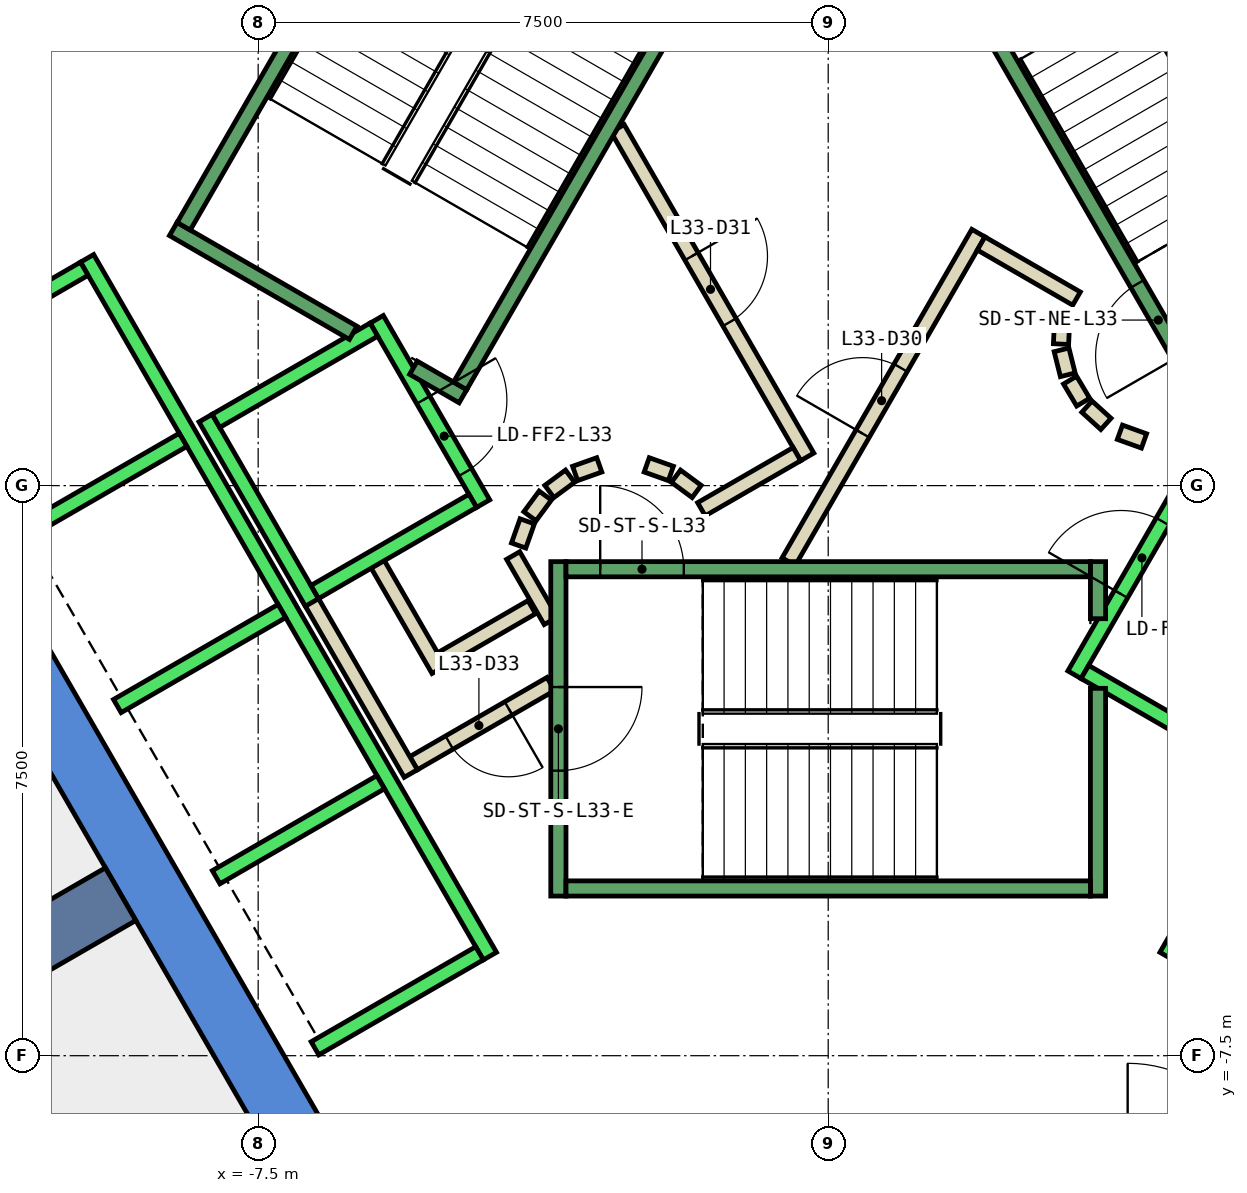
"""IFC4 building model, lengths in metres.
Left out: names, types, materials, properties, quantities, classifications, styles, units other than length and angle.
Written with IfcOpenShell. Run it as: python <this file> out.ifc"""

import sys

from ifc_helpers import new_model, si_unit, direction, frame, frame_2d, origin, place, context, subcontext, project, spatial, polyline, rectangle, outline, extrude, element, fill, save


model = new_model("IFC4")
c1 = context("Model", 3, precision=1e-05, world=origin(), true_north=direction((0.0, 1.0)))
c2 = subcontext(c1, "Body", "Model", "MODEL_VIEW")
j1 = project(units=[si_unit("LENGTHUNIT", "METRE"), si_unit("PLANEANGLEUNIT", "RADIAN")], contexts=[c1])
p1 = place(None, origin())
s1 = spatial("IfcSite", under=j1, at=p1, CompositionType="ELEMENT")
p2 = place(p1, origin())
s2 = spatial("IfcBuilding", under=s1, at=p2, CompositionType="ELEMENT")
p3 = place(p2, frame((0.0, 0.0, 150.8)))
s3 = spatial("IfcBuildingStorey", under=s2, at=p3, CompositionType="ELEMENT", Elevation=150.8)
p4 = place(p3, frame((0.0, 0.0, -0.4)))
e1 = element("IfcWall", 1, at=p4, inside=s3, PredefinedType="SHEAR", context=c2, shape_type="SweptSolid", body=[
    extrude(outline(polyline([(-12.267, 5.252), (-11.575, 4.852), (-6.466, 13.7), (-6.928, 14.5), (-12.267, 5.252)])), origin(), (0.0, 0.0, 1.0), 4.2),
])
p5 = place(p3, frame((0.0, 0.0, -0.4)))
e2 = element("IfcWall", 2, at=p5, inside=s3, PredefinedType="SHEAR", context=c2, shape_type="SweptSolid", body=[
    extrude(outline(polyline([(-13.856, 2.5), (-6.928, -9.5), (-6.466, -8.7), (-12.933, 2.5), (-13.856, 2.5)])), origin(), (0.0, 0.0, 1.0), 4.2),
])
p6 = place(p3, frame((-9.31, -5.375, -0.4), z_axis=(0.0, 0.0, 1.0), x_axis=(-0.866017533419, -0.500013631625, 0.0)))
e3 = element("IfcWall", 3, at=p6, inside=s3, PredefinedType="SHEAR", context=c2, shape_type="SweptSolid", body=[
    extrude(rectangle(XDim=9.0, YDim=0.8, at=frame_2d((4.5, 0.0))), origin(), (0.0, 0.0, 1.0), 4.2),
])
p7 = place(p3, frame((-3.9, -1.599, 0.0), z_axis=(0.0, 0.0, 1.0), x_axis=(-0.865969445389, -0.500096910261, 0.0)))
e4 = element("IfcWall", 4, at=p7, inside=s3, PredefinedType="PARTITIONING", context=c2, shape_type="SweptSolid", body=[
    extrude(rectangle(XDim=1.373, YDim=0.2, at=frame_2d((0.687, 0.0))), origin(), (0.0, 0.0, 1.0), 3.8),
])
p8 = place(p3, frame((-5.126, -2.422, 0.0), z_axis=(0.0, 0.0, 1.0), x_axis=(-0.500062241894, 0.865989465428, 0.0)))
e5 = element("IfcWall", 5, at=p8, inside=s3, PredefinedType="PARTITIONING", context=c2, shape_type="SweptSolid", body=[
    extrude(rectangle(XDim=1.7, YDim=0.2, at=frame_2d((0.85, 0.0))), origin(), (0.0, 0.0, 1.0), 3.8),
])
p9 = place(p3, frame((-3.65, -2.61, 0.0), z_axis=(0.0, 0.0, 1.0), x_axis=(-0.866072462134, -0.499918483688, 0.0)))
e6 = element("IfcWall", 6, at=p9, inside=s3, PredefinedType="PARTITIONING", context=c2, shape_type="SweptSolid", body=[
    extrude(rectangle(XDim=2.084, YDim=0.2, at=frame_2d((1.042, 0.0))), origin(), (0.0, 0.0, 1.0), 3.8),
])
p10 = place(p9, frame((0.642, 0.0, 0.0)))
e7 = element("IfcOpeningElement", 7, at=p10, cuts=e6, PredefinedType="OPENING", context=c2, shape_type="SweptSolid", body=[
    extrude(rectangle(XDim=0.9, YDim=2.1, at=frame_2d((0.45, 1.05))), frame((0.0, 0.11, 0.0), z_axis=(0.0, -1.0, 0.0), x_axis=(1.0, 0.0, 0.0)), (0.0, 0.0, 1.0), 0.22),
])
p11 = place(p3, frame((-5.492, -3.788, 0.0), z_axis=(0.0, 0.0, 1.0), x_axis=(-0.500008949224, 0.866020236886, 0.0)))
e8 = element("IfcWall", 8, at=p11, inside=s3, PredefinedType="PARTITIONING", context=c2, shape_type="SweptSolid", body=[
    extrude(rectangle(XDim=2.68, YDim=0.2, at=frame_2d((1.34, 0.0))), origin(), (0.0, 0.0, 1.0), 3.8),
])
p12 = place(p3, frame((-4.145, -0.92, 0.0), z_axis=(0.0, 0.0, 1.0), x_axis=(0.499743786207, -0.866173278362, 0.0)))
e9 = element("IfcWall", 9, at=p12, inside=s3, PredefinedType="PARTITIONING", context=c2, shape_type="SweptSolid", body=[
    extrude(rectangle(XDim=0.991, YDim=0.2, at=frame_2d((0.495, 0.0))), origin(), (0.0, 0.0, 1.0), 3.8),
])
p13 = place(p3, frame((-0.52, -1.0, 0.0), z_axis=(0.0, 0.0, 1.0), x_axis=(0.50011622646, 0.865958290007, 0.0)))
e10 = element("IfcWall", 10, at=p13, inside=s3, PredefinedType="PARTITIONING", context=c2, shape_type="SweptSolid", body=[
    extrude(rectangle(XDim=4.991, YDim=0.2, at=frame_2d((2.496, 0.0))), origin(), (0.0, 0.0, 1.0), 3.8),
])
p14 = place(p13, frame((1.945, 0.0, 0.0)))
e11 = element("IfcOpeningElement", 11, at=p14, cuts=e10, PredefinedType="OPENING", context=c2, shape_type="SweptSolid", body=[
    extrude(rectangle(XDim=1.0, YDim=2.1, at=frame_2d((0.5, 1.05))), frame((0.0, 0.11, 0.0), z_axis=(0.0, -1.0, 0.0), x_axis=(1.0, 0.0, 0.0)), (0.0, 0.0, 1.0), 0.22),
])
p15 = place(p3, frame((2.012, 3.186, 0.0), z_axis=(0.0, 0.0, 1.0), x_axis=(0.865891012941, -0.500232699559, 0.0)))
e12 = element("IfcWall", 12, at=p15, inside=s3, PredefinedType="PARTITIONING", context=c2, shape_type="SweptSolid", body=[
    extrude(rectangle(XDim=1.449, YDim=0.2, at=frame_2d((0.725, 0.0))), origin(), (0.0, 0.0, 1.0), 3.8),
])
p16 = place(p3, frame((3.079, 2.199, 0.0), z_axis=(0.0, 0.0, 1.0), x_axis=(-0.047771483479, -0.998858290933, 0.0)))
e13 = element("IfcWall", 13, at=p16, inside=s3, PredefinedType="PARTITIONING", context=c2, shape_type="SweptSolid", body=[
    extrude(rectangle(XDim=0.337, YDim=0.2, at=frame_2d((0.169, 0.0))), origin(), (0.0, 0.0, 1.0), 3.8),
])
p17 = place(p3, frame((3.07, 1.786, 0.0), z_axis=(0.0, 0.0, 1.0), x_axis=(0.242705583207, -0.970099994784, 0.0)))
e14 = element("IfcWall", 14, at=p17, inside=s3, PredefinedType="PARTITIONING", context=c2, shape_type="SweptSolid", body=[
    extrude(rectangle(XDim=0.338, YDim=0.2, at=frame_2d((0.169, 0.0))), origin(), (0.0, 0.0, 1.0), 3.8),
])
for number, where, z_axis, x_axis in (
    (15, (3.182, 1.388, 0.0), (0.0, 0.0, 1.0), (0.512, -0.859, 0.0)),
    (16, (3.404, 1.039, 0.0), (0.0, 0.0, 1.0), (0.74, -0.672, 0.0)),
):
    element("IfcWall", number, at=place(p3, frame(where, z_axis=z_axis, x_axis=x_axis)), inside=s3, PredefinedType="PARTITIONING", context=c2, shape_type="SweptSolid", body=[
        extrude(rectangle(XDim=0.338, YDim=0.2, at=frame_2d((0.169, 0.0))), origin(), (0.0, 0.0, 1.0), 3.8),
    ])
p18 = place(p3, frame((3.838, 0.702, 0.0), z_axis=(0.0, 0.0, 1.0), x_axis=(0.941035081519, -0.338308993895, 0.0)))
e17 = element("IfcWall", 17, at=p18, inside=s3, PredefinedType="PARTITIONING", context=c2, shape_type="SweptSolid", body=[
    extrude(rectangle(XDim=0.337, YDim=0.2, at=frame_2d((0.168, 0.0))), origin(), (0.0, 0.0, 1.0), 3.8),
])
p19 = place(p3, frame((-2.771, 4.7, 0.0), z_axis=(0.0, 0.0, 1.0), x_axis=(0.499969479948, -0.866043023828, 0.0)))
e18 = element("IfcWall", 18, at=p19, inside=s3, PredefinedType="PARTITIONING", context=c2, shape_type="SweptSolid", body=[
    extrude(rectangle(XDim=4.99, YDim=0.2, at=frame_2d((2.495, 0.0))), origin(), (0.0, 0.0, 1.0), 3.8),
])
p20 = place(p19, frame((1.945, 0.0, 0.0)))
e19 = element("IfcOpeningElement", 19, at=p20, cuts=e18, PredefinedType="OPENING", context=c2, shape_type="SweptSolid", body=[
    extrude(rectangle(XDim=1.0, YDim=2.1, at=frame_2d((0.5, 1.05))), frame((0.0, 0.11, 0.0), z_axis=(0.0, -1.0, 0.0), x_axis=(1.0, 0.0, 0.0)), (0.0, 0.0, 1.0), 0.22),
])
p21 = place(p3, frame((-0.412, 0.414, 0.0), z_axis=(0.0, 0.0, 1.0), x_axis=(-0.866017369001, -0.500013916395, 0.0)))
e20 = element("IfcWall", 20, at=p21, inside=s3, PredefinedType="PARTITIONING", context=c2, shape_type="SweptSolid", body=[
    extrude(rectangle(XDim=1.45, YDim=0.2, at=frame_2d((0.725, 0.0))), origin(), (0.0, 0.0, 1.0), 3.8),
])
p22 = place(p3, frame((-1.731, -0.077, 0.0), z_axis=(0.0, 0.0, 1.0), x_axis=(-0.804311165252, 0.594208338422, 0.0)))
e21 = element("IfcWall", 21, at=p22, inside=s3, PredefinedType="PARTITIONING", context=c2, shape_type="SweptSolid", body=[
    extrude(rectangle(XDim=0.338, YDim=0.2, at=frame_2d((0.169, 0.0))), origin(), (0.0, 0.0, 1.0), 3.8),
])
p23 = place(p3, frame((-2.07, 0.16, 0.0), z_axis=(0.0, 0.0, 1.0), x_axis=(-0.942199461132, 0.335052496547, 0.0)))
e22 = element("IfcWall", 22, at=p23, inside=s3, PredefinedType="PARTITIONING", context=c2, shape_type="SweptSolid", body=[
    extrude(rectangle(XDim=0.337, YDim=0.2, at=frame_2d((0.169, 0.0))), origin(), (0.0, 0.0, 1.0), 3.8),
])
p24 = place(p3, frame((-3.012, 0.273, 0.0), z_axis=(0.0, 0.0, 1.0), x_axis=(-0.942280615813, -0.334824194261, 0.0)))
e23 = element("IfcWall", 23, at=p24, inside=s3, PredefinedType="PARTITIONING", context=c2, shape_type="SweptSolid", body=[
    extrude(rectangle(XDim=0.338, YDim=0.2, at=frame_2d((0.169, 0.0))), origin(), (0.0, 0.0, 1.0), 3.8),
])
p25 = place(p3, frame((-3.397, 0.124, 0.0), z_axis=(0.0, 0.0, 1.0), x_axis=(-0.804311165252, -0.594208338422, 0.0)))
e24 = element("IfcWall", 24, at=p25, inside=s3, PredefinedType="PARTITIONING", context=c2, shape_type="SweptSolid", body=[
    extrude(rectangle(XDim=0.338, YDim=0.2, at=frame_2d((0.169, 0.0))), origin(), (0.0, 0.0, 1.0), 3.8),
])
p26 = place(p3, frame((-3.723, -0.131, 0.0), z_axis=(0.0, 0.0, 1.0), x_axis=(-0.594675113454, -0.803966112121, 0.0)))
e25 = element("IfcWall", 25, at=p26, inside=s3, PredefinedType="PARTITIONING", context=c2, shape_type="SweptSolid", body=[
    extrude(rectangle(XDim=0.338, YDim=0.2, at=frame_2d((0.169, 0.0))), origin(), (0.0, 0.0, 1.0), 3.8),
])
p27 = place(p3, frame((-3.96, -0.47, 0.0), z_axis=(0.0, 0.0, 1.0), x_axis=(-0.334824194261, -0.942280615813, 0.0)))
e26 = element("IfcWall", 26, at=p27, inside=s3, PredefinedType="PARTITIONING", context=c2, shape_type="SweptSolid", body=[
    extrude(rectangle(XDim=0.338, YDim=0.2, at=frame_2d((0.169, 0.0))), origin(), (0.0, 0.0, 1.0), 3.8),
])
p28 = place(p3, frame((-5.94, 2.188, 0.0), z_axis=(0.0, 0.0, 1.0), x_axis=(0.49994636267, -0.866056369097, 0.0)))
e27 = element("IfcWall", 27, at=p28, inside=s3, PredefinedType="STANDARD", context=c2, shape_type="SweptSolid", body=[
    extrude(rectangle(XDim=2.8, YDim=0.2, at=frame_2d((1.4, 0.0))), origin(), (0.0, 0.0, 1.0), 3.8),
])
p29 = place(p28, frame((1.225, 0.0, 0.0)))
e28 = element("IfcOpeningElement", 28, at=p29, cuts=e27, PredefinedType="OPENING", context=c2, shape_type="SweptSolid", body=[
    extrude(rectangle(XDim=1.1, YDim=2.1, at=frame_2d((0.55, 1.05))), frame((0.0, 0.11, 0.0), z_axis=(0.0, -1.0, 0.0), x_axis=(1.0, 0.0, 0.0)), (0.0, 0.0, 1.0), 0.22),
])
p30 = place(p3, frame((-8.192, 0.888, 0.0), z_axis=(0.0, 0.0, 1.0), x_axis=(0.49994636267, -0.866056369097, 0.0)))
e29 = element("IfcWall", 29, at=p30, inside=s3, PredefinedType="STANDARD", context=c2, shape_type="SweptSolid", body=[
    extrude(rectangle(XDim=2.8, YDim=0.2, at=frame_2d((1.4, 0.0))), origin(), (0.0, 0.0, 1.0), 3.8),
])
for number, where, z_axis, x_axis in (
    (30, (-5.977, 2.052, 0.0), (0.0, 0.0, 1.0), (-0.866, -0.5, 0.0)),
    (31, (-4.677, -0.2, 0.0), (0.0, 0.0, 1.0), (-0.866, -0.5, 0.0)),
):
    element("IfcWall", number, at=place(p3, frame(where, z_axis=z_axis, x_axis=x_axis)), inside=s3, PredefinedType="STANDARD", context=c2, shape_type="SweptSolid", body=[
        extrude(rectangle(XDim=2.399, YDim=0.2, at=frame_2d((1.2, 0.0))), origin(), (0.0, 0.0, 1.0), 3.8),
    ])
p31 = place(p3, frame((-9.751, 2.99, 0.0), z_axis=(0.0, 0.0, 1.0), x_axis=(0.50000090737, -0.866024879913, 0.0)))
e32 = element("IfcWall", 32, at=p31, inside=s3, PredefinedType="STANDARD", context=c2, shape_type="SweptSolid", body=[
    extrude(rectangle(XDim=10.6, YDim=0.2, at=frame_2d((5.3, 0.0))), origin(), (0.0, 0.0, 1.0), 3.8),
])
p32 = place(p3, frame((-9.788, 2.853, 0.0), z_axis=(0.0, 0.0, 1.0), x_axis=(-0.865998541277, -0.500046524342, 0.0)))
e33 = element("IfcWall", 33, at=p32, inside=s3, PredefinedType="STANDARD", context=c2, shape_type="SweptSolid", body=[
    extrude(rectangle(XDim=2.5, YDim=0.2, at=frame_2d((1.25, 0.0))), origin(), (0.0, 0.0, 1.0), 3.8),
])
for number, where, z_axis, x_axis in (
    (34, (-8.488, 0.602, 0.0), (0.0, 0.0, 1.0), (-0.866, -0.5, 0.0)),
    (35, (-7.188, -1.65, 0.0), (0.0, 0.0, 1.0), (-0.866, -0.5, 0.0)),
    (36, (-5.888, -3.902, 0.0), (0.0, 0.0, 1.0), (-0.866, -0.5, 0.0)),
    (37, (-4.588, -6.153, 0.0), (0.0, 0.0, 1.0), (-0.866, -0.5, 0.0)),
):
    element("IfcWall", number, at=place(p3, frame(where, z_axis=z_axis, x_axis=x_axis)), inside=s3, PredefinedType="STANDARD", context=c2, shape_type="SweptSolid", body=[
        extrude(rectangle(XDim=2.5, YDim=0.2, at=frame_2d((1.25, 0.0))), origin(), (0.0, 0.0, 1.0), 3.8),
    ])
p33 = place(p3, frame((3.24, -2.488, 0.0), z_axis=(0.0, 0.0, 1.0), x_axis=(0.49994636267, 0.866056369097, 0.0)))
e38 = element("IfcWall", 38, at=p33, inside=s3, PredefinedType="STANDARD", context=c2, shape_type="SweptSolid", body=[
    extrude(rectangle(XDim=2.8, YDim=0.2, at=frame_2d((1.4, 0.0))), origin(), (0.0, 0.0, 1.0), 3.8),
])
p34 = place(p33, frame((1.225, 0.0, 0.0)))
e39 = element("IfcOpeningElement", 39, at=p34, cuts=e38, PredefinedType="OPENING", context=c2, shape_type="SweptSolid", body=[
    extrude(rectangle(XDim=1.1, YDim=2.1, at=frame_2d((0.55, 1.05))), frame((0.0, 0.11, 0.0), z_axis=(0.0, -1.0, 0.0), x_axis=(1.0, 0.0, 0.0)), (0.0, 0.0, 1.0), 0.22),
])
p35 = place(p3, frame((3.377, -2.452, 0.0), z_axis=(0.0, 0.0, 1.0), x_axis=(0.865955154139, -0.50012165622, 0.0)))
e40 = element("IfcWall", 40, at=p35, inside=s3, PredefinedType="STANDARD", context=c2, shape_type="SweptSolid", body=[
    extrude(rectangle(XDim=2.4, YDim=0.2, at=frame_2d((1.2, 0.0))), origin(), (0.0, 0.0, 1.0), 3.8),
])
p36 = place(p3, frame((4.451, -6.19, 0.0), z_axis=(0.0, 0.0, 1.0), x_axis=(0.50000090737, 0.866024879913, 0.0)))
e41 = element("IfcWall", 41, at=p36, inside=s3, PredefinedType="STANDARD", context=c2, shape_type="SweptSolid", body=[
    extrude(rectangle(XDim=10.6, YDim=0.2, at=frame_2d((5.3, 0.0))), origin(), (0.0, 0.0, 1.0), 3.8),
])
p37 = place(p3, frame((-3.55, -1.0, 0.0), z_axis=(0.0, 0.0, 1.0), x_axis=(0.0, -1.0, 0.0)))
e42 = element("IfcWall", 42, at=p37, inside=s3, PredefinedType="STANDARD", context=c2, shape_type="SweptSolid", body=[
    extrude(rectangle(XDim=4.4, YDim=0.2, at=frame_2d((2.2, 0.0))), origin(), (0.0, 0.0, 1.0), 3.8),
])
p38 = place(p37, frame((1.65, 0.0, 0.0)))
e43 = element("IfcOpeningElement", 43, at=p38, cuts=e42, PredefinedType="OPENING", context=c2, shape_type="SweptSolid", body=[
    extrude(rectangle(XDim=1.1, YDim=2.2, at=frame_2d((0.55, 1.1))), frame((0.0, 0.11, 0.0), z_axis=(0.0, -1.0, 0.0), x_axis=(1.0, 0.0, 0.0)), (0.0, 0.0, 1.0), 0.22),
])
p39 = place(p3, frame((3.55, -2.667, 0.0), z_axis=(0.0, 0.0, 1.0), x_axis=(0.0, -1.0, 0.0)))
e44 = element("IfcWall", 44, at=p39, inside=s3, PredefinedType="STANDARD", context=c2, shape_type="SweptSolid", body=[
    extrude(rectangle(XDim=2.733, YDim=0.2, at=frame_2d((1.366, 0.0))), origin(), (0.0, 0.0, 1.0), 3.8),
])
p40 = place(p3, frame((3.55, -1.0, 0.0), z_axis=(0.0, 0.0, 1.0), x_axis=(0.0, -1.0, 0.0)))
e45 = element("IfcWall", 45, at=p40, inside=s3, PredefinedType="STANDARD", context=c2, shape_type="SweptSolid", body=[
    extrude(rectangle(XDim=0.751, YDim=0.2, at=frame_2d((0.375, 0.0))), origin(), (0.0, 0.0, 1.0), 3.8),
])
p41 = place(p3, frame((-3.45, -1.1, 0.0), z_axis=(0.0, 0.0, 1.0), x_axis=(1.0, 0.0, 0.0)))
e46 = element("IfcWall", 46, at=p41, inside=s3, PredefinedType="STANDARD", context=c2, shape_type="SweptSolid", body=[
    extrude(rectangle(XDim=6.9, YDim=0.2, at=frame_2d((3.45, 0.0))), origin(), (0.0, 0.0, 1.0), 3.8),
])
p42 = place(p41, frame((0.45, 0.0, 0.0)))
e47 = element("IfcOpeningElement", 47, at=p42, cuts=e46, PredefinedType="OPENING", context=c2, shape_type="SweptSolid", body=[
    extrude(rectangle(XDim=1.1, YDim=2.2, at=frame_2d((0.55, 1.1))), frame((0.0, 0.11, 0.0), z_axis=(0.0, -1.0, 0.0), x_axis=(1.0, 0.0, 0.0)), (0.0, 0.0, 1.0), 0.22),
])
p43 = place(p3, frame((-3.45, -5.3, 0.0), z_axis=(0.0, 0.0, 1.0), x_axis=(1.0, 0.0, 0.0)))
e48 = element("IfcWall", 48, at=p43, inside=s3, PredefinedType="STANDARD", context=c2, shape_type="SweptSolid", body=[
    extrude(rectangle(XDim=6.9, YDim=0.2, at=frame_2d((3.45, 0.0))), origin(), (0.0, 0.0, 1.0), 3.8),
])
p44 = place(p3, frame((4.843, 1.312, 0.0), z_axis=(0.0, 0.0, 1.0), x_axis=(-0.499963383562, 0.866046543262, 0.0)))
e49 = element("IfcWall", 49, at=p44, inside=s3, PredefinedType="STANDARD", context=c2, shape_type="SweptSolid", body=[
    extrude(rectangle(XDim=6.9, YDim=0.2, at=frame_2d((3.45, 0.0))), origin(), (0.0, 0.0, 1.0), 3.8),
])
p45 = place(p44, frame((0.45, 0.0, 0.0)))
e50 = element("IfcOpeningElement", 50, at=p45, cuts=e49, PredefinedType="OPENING", context=c2, shape_type="SweptSolid", body=[
    extrude(rectangle(XDim=1.1, YDim=2.2, at=frame_2d((0.55, 1.1))), frame((0.0, 0.11, 0.0), z_axis=(0.0, -1.0, 0.0), x_axis=(1.0, 0.0, 0.0)), (0.0, 0.0, 1.0), 0.22),
])
p46 = place(p3, frame((-6.25, 2.01, 0.0), z_axis=(0.0, 0.0, 1.0), x_axis=(-0.86611865017, 0.499838457731, 0.0)))
e51 = element("IfcWall", 51, at=p46, inside=s3, PredefinedType="STANDARD", context=c2, shape_type="SweptSolid", body=[
    extrude(rectangle(XDim=2.733, YDim=0.2, at=frame_2d((1.366, 0.0))), origin(), (0.0, 0.0, 1.0), 3.8),
])
p47 = place(p3, frame((-4.806, 1.176, 0.0), z_axis=(0.0, 0.0, 1.0), x_axis=(-0.866558586415, 0.499075361355, 0.0)))
e52 = element("IfcWall", 52, at=p47, inside=s3, PredefinedType="STANDARD", context=c2, shape_type="SweptSolid", body=[
    extrude(rectangle(XDim=0.751, YDim=0.2, at=frame_2d((0.376, 0.0))), origin(), (0.0, 0.0, 1.0), 3.8),
])
p48 = place(p3, frame((-1.393, 7.288, 0.0), z_axis=(0.0, 0.0, 1.0), x_axis=(-0.499963383562, -0.866046543262, 0.0)))
e53 = element("IfcWall", 53, at=p48, inside=s3, PredefinedType="STANDARD", context=c2, shape_type="SweptSolid", body=[
    extrude(rectangle(XDim=6.9, YDim=0.2, at=frame_2d((3.45, 0.0))), origin(), (0.0, 0.0, 1.0), 3.8),
])
p49 = place(p48, frame((0.45, 0.0, 0.0)))
e54 = element("IfcOpeningElement", 54, at=p49, cuts=e53, PredefinedType="OPENING", context=c2, shape_type="SweptSolid", body=[
    extrude(rectangle(XDim=1.1, YDim=2.2, at=frame_2d((0.55, 1.1))), frame((0.0, 0.11, 0.0), z_axis=(0.0, -1.0, 0.0), x_axis=(1.0, 0.0, 0.0)), (0.0, 0.0, 1.0), 0.22),
])
p50 = place(p3, frame((-5.03, 9.388, 0.0), z_axis=(0.0, 0.0, 1.0), x_axis=(-0.499978703459, -0.866037698999, 0.0)))
e55 = element("IfcWall", 55, at=p50, inside=s3, PredefinedType="STANDARD", context=c2, shape_type="SweptSolid", body=[
    extrude(rectangle(XDim=6.9, YDim=0.2, at=frame_2d((3.45, 0.0))), origin(), (0.0, 0.0, 1.0), 3.8),
])
p51 = place(p14, origin())
e56 = element("IfcDoor", 56, at=p51, inside=s3, OperationType="SINGLE_SWING_LEFT", PredefinedType="DOOR", context=c2, shape_type="SweptSolid", body=[
    extrude(rectangle(XDim=1.0, YDim=2.1, at=frame_2d((0.5, 1.05))), frame((0.0, 0.025, 0.0), z_axis=(0.0, -1.0, 0.0), x_axis=(1.0, 0.0, 0.0)), (0.0, 0.0, 1.0), 0.05),
])
fill(e11, e56)
p52 = place(p20, origin())
e57 = element("IfcDoor", 57, at=p52, inside=s3, OperationType="SINGLE_SWING_RIGHT", PredefinedType="DOOR", context=c2, shape_type="SweptSolid", body=[
    extrude(rectangle(XDim=1.0, YDim=2.1, at=frame_2d((0.5, 1.05))), frame((0.0, 0.025, 0.0), z_axis=(0.0, -1.0, 0.0), x_axis=(1.0, 0.0, 0.0)), (0.0, 0.0, 1.0), 0.05),
])
fill(e19, e57)
p53 = place(p10, origin())
e58 = element("IfcDoor", 58, at=p53, inside=s3, OperationType="SINGLE_SWING_LEFT", PredefinedType="DOOR", context=c2, shape_type="SweptSolid", body=[
    extrude(rectangle(XDim=0.9, YDim=2.1, at=frame_2d((0.45, 1.05))), frame((0.0, 0.025, 0.0), z_axis=(0.0, -1.0, 0.0), x_axis=(1.0, 0.0, 0.0)), (0.0, 0.0, 1.0), 0.05),
])
fill(e7, e58)
p54 = place(p34, origin())
e59 = element("IfcDoor", 59, at=p54, inside=s3, OperationType="SLIDING_TO_LEFT", PredefinedType="DOOR", context=c2, shape_type="SweptSolid", body=[
    extrude(rectangle(XDim=1.1, YDim=2.1, at=frame_2d((0.55, 1.05))), frame((0.0, 0.025, 0.0), z_axis=(0.0, -1.0, 0.0), x_axis=(1.0, 0.0, 0.0)), (0.0, 0.0, 1.0), 0.05),
])
fill(e39, e59)
p55 = place(p29, origin())
e60 = element("IfcDoor", 60, at=p55, inside=s3, OperationType="SLIDING_TO_LEFT", PredefinedType="DOOR", context=c2, shape_type="SweptSolid", body=[
    extrude(rectangle(XDim=1.1, YDim=2.1, at=frame_2d((0.55, 1.05))), frame((0.0, 0.025, 0.0), z_axis=(0.0, -1.0, 0.0), x_axis=(1.0, 0.0, 0.0)), (0.0, 0.0, 1.0), 0.05),
])
fill(e28, e60)
p56 = place(p42, origin())
e61 = element("IfcDoor", 61, at=p56, inside=s3, OperationType="SINGLE_SWING_LEFT", PredefinedType="DOOR", context=c2, shape_type="SweptSolid", body=[
    extrude(rectangle(XDim=1.1, YDim=2.2, at=frame_2d((0.55, 1.1))), frame((0.0, 0.025, 0.0), z_axis=(0.0, -1.0, 0.0), x_axis=(1.0, 0.0, 0.0)), (0.0, 0.0, 1.0), 0.05),
])
fill(e47, e61)
p57 = place(p38, origin())
e62 = element("IfcDoor", 62, at=p57, inside=s3, OperationType="SINGLE_SWING_LEFT", PredefinedType="DOOR", context=c2, shape_type="SweptSolid", body=[
    extrude(rectangle(XDim=1.1, YDim=2.2, at=frame_2d((0.55, 1.1))), frame((0.0, 0.025, 0.0), z_axis=(0.0, -1.0, 0.0), x_axis=(1.0, 0.0, 0.0)), (0.0, 0.0, 1.0), 0.05),
])
fill(e43, e62)
p58 = place(p45, origin())
e63 = element("IfcDoor", 63, at=p58, inside=s3, OperationType="SINGLE_SWING_LEFT", PredefinedType="DOOR", context=c2, shape_type="SweptSolid", body=[
    extrude(rectangle(XDim=1.1, YDim=2.2, at=frame_2d((0.55, 1.1))), frame((0.0, 0.025, 0.0), z_axis=(0.0, -1.0, 0.0), x_axis=(1.0, 0.0, 0.0)), (0.0, 0.0, 1.0), 0.05),
])
fill(e50, e63)
save(model, sys.argv[1])
